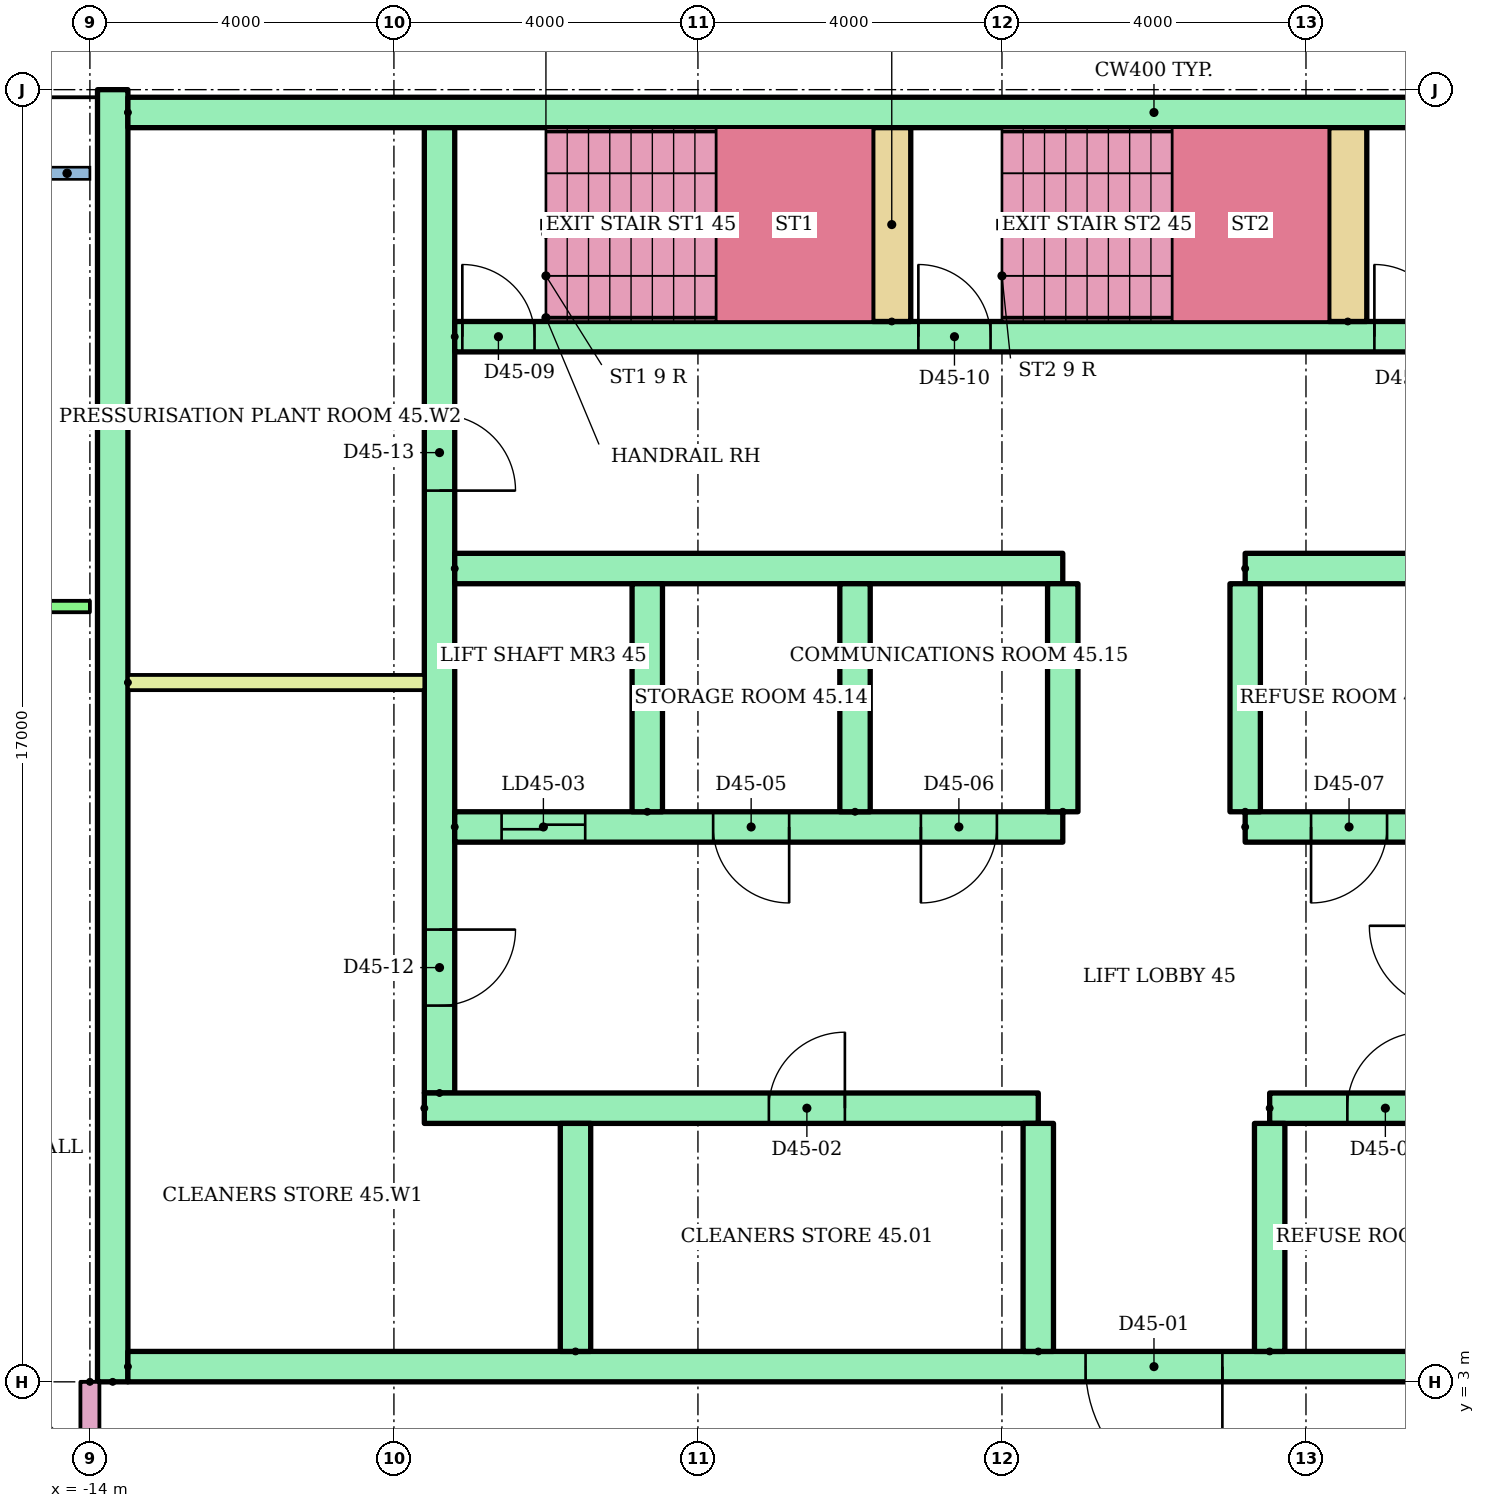
"""IFC4 building model, lengths in metres.
Left out: names, types, materials, properties, quantities, classifications, styles, units other than length and angle.
Written with IfcOpenShell. Run it as: python <this file> out.ifc"""

import sys

from ifc_helpers import new_model, si_unit, direction, frame, frame_2d, origin, place, context, subcontext, project, spatial, rectangle, extrude, element, fill, save


model = new_model("IFC4")
c1 = context("Model", 3, precision=1e-05, world=origin(), true_north=direction((0.0, 1.0)))
c2 = subcontext(c1, "Body", "Model", "MODEL_VIEW")
j1 = project(units=[si_unit("LENGTHUNIT", "METRE"), si_unit("PLANEANGLEUNIT", "RADIAN")], contexts=[c1])
p1 = place(None, origin())
s1 = spatial("IfcSite", under=j1, at=p1, CompositionType="ELEMENT")
p2 = place(p1, origin())
s2 = spatial("IfcBuilding", under=s1, at=p2, CompositionType="ELEMENT")
p3 = place(p2, frame((0.0, 0.0, 174.9)))
s3 = spatial("IfcBuildingStorey", under=s2, at=p3, CompositionType="ELEMENT", Elevation=174.9)
p4 = place(p3, frame((-13.7, 3.0, 0.0), z_axis=(0.0, 0.0, 1.0), x_axis=(0.0, 1.0, 0.0)))
e1 = element("IfcWall", 1, at=p4, inside=s3, PredefinedType="SHEAR", context=c2, shape_type="SweptSolid", body=[
    extrude(rectangle(XDim=17.0, YDim=0.4, at=frame_2d((8.5, 0.0))), origin(), (0.0, 0.0, 1.0), 2.92),
])
p5 = place(p3, frame((-13.5, 19.7, 0.0)))
e2 = element("IfcWall", 2, at=p5, inside=s3, PredefinedType="SHEAR", context=c2, shape_type="SweptSolid", body=[
    extrude(rectangle(XDim=27.0, YDim=0.4, at=frame_2d((13.5, 0.0))), origin(), (0.0, 0.0, 1.0), 2.92),
])
p6 = place(p3, frame((-9.4, 6.8, 0.0), z_axis=(0.0, 0.0, 1.0), x_axis=(0.0, 1.0, 0.0)))
e3 = element("IfcWall", 3, at=p6, inside=s3, PredefinedType="SHEAR", context=c2, shape_type="SweptSolid", body=[
    extrude(rectangle(XDim=12.7, YDim=0.4, at=frame_2d((6.35, 0.0))), origin(), (0.0, 0.0, 1.0), 2.92),
])
p7 = place(p6, frame((1.15, 0.0, 0.0)))
e4 = element("IfcOpeningElement", 4, at=p7, cuts=e3, PredefinedType="OPENING", context=c2, shape_type="SweptSolid", body=[
    extrude(rectangle(XDim=1.0, YDim=2.1, at=frame_2d((0.5, 1.05))), frame((0.0, 0.21, 0.0), z_axis=(0.0, -1.0, 0.0), x_axis=(1.0, 0.0, 0.0)), (0.0, 0.0, 1.0), 0.42),
])
p8 = place(p6, frame((7.925, 0.0, 0.0)))
e5 = element("IfcOpeningElement", 5, at=p8, cuts=e3, PredefinedType="OPENING", context=c2, shape_type="SweptSolid", body=[
    extrude(rectangle(XDim=1.0, YDim=2.1, at=frame_2d((0.5, 1.05))), frame((0.0, 0.21, 0.0), z_axis=(0.0, -1.0, 0.0), x_axis=(1.0, 0.0, 0.0)), (0.0, 0.0, 1.0), 0.42),
])
p9 = place(p3, frame((-13.5, 3.2, 0.0)))
e6 = element("IfcWall", 6, at=p9, inside=s3, PredefinedType="SHEAR", context=c2, shape_type="SweptSolid", body=[
    extrude(rectangle(XDim=27.0, YDim=0.4, at=frame_2d((13.5, 0.0))), origin(), (0.0, 0.0, 1.0), 2.92),
])
p10 = place(p9, frame((22.083, 0.0, 0.0)))
e7 = element("IfcOpeningElement", 7, at=p10, cuts=e6, PredefinedType="OPENING", context=c2, shape_type="SweptSolid", body=[
    extrude(rectangle(XDim=1.1, YDim=2.1, at=frame_2d((0.55, 1.05))), frame((0.0, 0.21, 0.0), z_axis=(0.0, -1.0, 0.0), x_axis=(1.0, 0.0, 0.0)), (0.0, 0.0, 1.0), 0.42),
])
p11 = place(p9, frame((25.128, 0.0, 0.0)))
e8 = element("IfcOpeningElement", 8, at=p11, cuts=e6, PredefinedType="OPENING", context=c2, shape_type="SweptSolid", body=[
    extrude(rectangle(XDim=1.1, YDim=2.1, at=frame_2d((0.55, 1.05))), frame((0.0, 0.21, 0.0), z_axis=(0.0, -1.0, 0.0), x_axis=(1.0, 0.0, 0.0)), (0.0, 0.0, 1.0), 0.42),
])
p12 = place(p9, frame((12.6, 0.0, 0.0)))
e9 = element("IfcOpeningElement", 9, at=p12, cuts=e6, PredefinedType="OPENING", context=c2, shape_type="SweptSolid", body=[
    extrude(rectangle(XDim=1.8, YDim=2.1, at=frame_2d((0.9, 1.05))), frame((0.0, 0.21, 0.0), z_axis=(0.0, -1.0, 0.0), x_axis=(1.0, 0.0, 0.0)), (0.0, 0.0, 1.0), 0.42),
])
p13 = place(p3, frame((-9.6, 6.6, 0.0)))
e10 = element("IfcWall", 10, at=p13, inside=s3, PredefinedType="SHEAR", context=c2, shape_type="SweptSolid", body=[
    extrude(rectangle(XDim=8.078, YDim=0.4, at=frame_2d((4.039, 0.0))), origin(), (0.0, 0.0, 1.0), 2.92),
])
p14 = place(p13, frame((4.533, 0.0, 0.0)))
e11 = element("IfcOpeningElement", 11, at=p14, cuts=e10, PredefinedType="OPENING", context=c2, shape_type="SweptSolid", body=[
    extrude(rectangle(XDim=1.0, YDim=2.1, at=frame_2d((0.5, 1.05))), frame((0.0, 0.21, 0.0), z_axis=(0.0, -1.0, 0.0), x_axis=(1.0, 0.0, 0.0)), (0.0, 0.0, 1.0), 0.42),
])
p15 = place(p3, frame((1.522, 6.6, 0.0)))
e12 = element("IfcWall", 12, at=p15, inside=s3, PredefinedType="SHEAR", context=c2, shape_type="SweptSolid", body=[
    extrude(rectangle(XDim=11.978, YDim=0.4, at=frame_2d((5.989, 0.0))), origin(), (0.0, 0.0, 1.0), 2.92),
])
p16 = place(p15, frame((1.022, 0.0, 0.0)))
e13 = element("IfcOpeningElement", 13, at=p16, cuts=e12, PredefinedType="OPENING", context=c2, shape_type="SweptSolid", body=[
    extrude(rectangle(XDim=1.0, YDim=2.1, at=frame_2d((0.5, 1.05))), frame((0.0, 0.21, 0.0), z_axis=(0.0, -1.0, 0.0), x_axis=(1.0, 0.0, 0.0)), (0.0, 0.0, 1.0), 0.42),
])
p17 = place(p15, frame((4.067, 0.0, 0.0)))
e14 = element("IfcOpeningElement", 14, at=p17, cuts=e12, PredefinedType="OPENING", context=c2, shape_type="SweptSolid", body=[
    extrude(rectangle(XDim=1.0, YDim=2.1, at=frame_2d((0.5, 1.05))), frame((0.0, 0.21, 0.0), z_axis=(0.0, -1.0, 0.0), x_axis=(1.0, 0.0, 0.0)), (0.0, 0.0, 1.0), 0.42),
])
for number, where, z_axis, x_axis in (
    (15, (-7.611, 3.4, 0.0), (0.0, 0.0, 1.0), (0.0, 1.0, 0.0)),
    (16, (-1.522, 3.4, 0.0), (0.0, 0.0, 1.0), (0.0, 1.0, 0.0)),
    (17, (1.522, 3.4, 0.0), (0.0, 0.0, 1.0), (0.0, 1.0, 0.0)),
):
    element("IfcWall", number, at=place(p3, frame(where, z_axis=z_axis, x_axis=x_axis)), inside=s3, PredefinedType="SHEAR", context=c2, shape_type="SweptSolid", body=[
        extrude(rectangle(XDim=3.0, YDim=0.4, at=frame_2d((1.5, 0.0))), origin(), (0.0, 0.0, 1.0), 2.92),
    ])
p18 = place(p3, frame((-9.2, 10.3, 0.0)))
e18 = element("IfcWall", 18, at=p18, inside=s3, PredefinedType="SHEAR", context=c2, shape_type="SweptSolid", body=[
    extrude(rectangle(XDim=8.0, YDim=0.4, at=frame_2d((4.0, 0.0))), origin(), (0.0, 0.0, 1.0), 2.92),
])
p19 = place(p18, frame((0.617, 0.0, 0.0)))
e19 = element("IfcOpeningElement", 19, at=p19, cuts=e18, PredefinedType="OPENING", context=c2, shape_type="SweptSolid", body=[
    extrude(rectangle(XDim=1.1, YDim=2.1, at=frame_2d((0.55, 1.05))), frame((0.0, 0.21, 0.0), z_axis=(0.0, -1.0, 0.0), x_axis=(1.0, 0.0, 0.0)), (0.0, 0.0, 1.0), 0.42),
])
p20 = place(p18, frame((3.4, 0.0, 0.0)))
e20 = element("IfcOpeningElement", 20, at=p20, cuts=e18, PredefinedType="OPENING", context=c2, shape_type="SweptSolid", body=[
    extrude(rectangle(XDim=1.0, YDim=2.1, at=frame_2d((0.5, 1.05))), frame((0.0, 0.21, 0.0), z_axis=(0.0, -1.0, 0.0), x_axis=(1.0, 0.0, 0.0)), (0.0, 0.0, 1.0), 0.42),
])
p21 = place(p18, frame((6.133, 0.0, 0.0)))
e21 = element("IfcOpeningElement", 21, at=p21, cuts=e18, PredefinedType="OPENING", context=c2, shape_type="SweptSolid", body=[
    extrude(rectangle(XDim=1.0, YDim=2.1, at=frame_2d((0.5, 1.05))), frame((0.0, 0.21, 0.0), z_axis=(0.0, -1.0, 0.0), x_axis=(1.0, 0.0, 0.0)), (0.0, 0.0, 1.0), 0.42),
])
p22 = place(p3, frame((-9.2, 13.7, 0.0)))
e22 = element("IfcWall", 22, at=p22, inside=s3, PredefinedType="SHEAR", context=c2, shape_type="SweptSolid", body=[
    extrude(rectangle(XDim=8.0, YDim=0.4, at=frame_2d((4.0, 0.0))), origin(), (0.0, 0.0, 1.0), 2.92),
])
p23 = place(p3, frame((1.2, 10.3, 0.0)))
e23 = element("IfcWall", 23, at=p23, inside=s3, PredefinedType="SHEAR", context=c2, shape_type="SweptSolid", body=[
    extrude(rectangle(XDim=8.0, YDim=0.4, at=frame_2d((4.0, 0.0))), origin(), (0.0, 0.0, 1.0), 2.92),
])
p24 = place(p23, frame((3.55, 0.0, 0.0)))
e24 = element("IfcOpeningElement", 24, at=p24, cuts=e23, PredefinedType="OPENING", context=c2, shape_type="SweptSolid", body=[
    extrude(rectangle(XDim=1.1, YDim=2.1, at=frame_2d((0.55, 1.05))), frame((0.0, 0.21, 0.0), z_axis=(0.0, -1.0, 0.0), x_axis=(1.0, 0.0, 0.0)), (0.0, 0.0, 1.0), 0.42),
])
p25 = place(p23, frame((6.283, 0.0, 0.0)))
e25 = element("IfcOpeningElement", 25, at=p25, cuts=e23, PredefinedType="OPENING", context=c2, shape_type="SweptSolid", body=[
    extrude(rectangle(XDim=1.1, YDim=2.1, at=frame_2d((0.55, 1.05))), frame((0.0, 0.21, 0.0), z_axis=(0.0, -1.0, 0.0), x_axis=(1.0, 0.0, 0.0)), (0.0, 0.0, 1.0), 0.42),
])
p26 = place(p23, frame((0.867, 0.0, 0.0)))
e26 = element("IfcOpeningElement", 26, at=p26, cuts=e23, PredefinedType="OPENING", context=c2, shape_type="SweptSolid", body=[
    extrude(rectangle(XDim=1.0, YDim=2.1, at=frame_2d((0.5, 1.05))), frame((0.0, 0.21, 0.0), z_axis=(0.0, -1.0, 0.0), x_axis=(1.0, 0.0, 0.0)), (0.0, 0.0, 1.0), 0.42),
])
p27 = place(p3, frame((1.2, 13.7, 0.0)))
e27 = element("IfcWall", 27, at=p27, inside=s3, PredefinedType="SHEAR", context=c2, shape_type="SweptSolid", body=[
    extrude(rectangle(XDim=8.0, YDim=0.4, at=frame_2d((4.0, 0.0))), origin(), (0.0, 0.0, 1.0), 2.92),
])
for number, where, z_axis, x_axis in (
    (28, (-6.667, 10.5, 0.0), (0.0, 0.0, 1.0), (0.0, 1.0, 0.0)),
    (29, (-3.933, 10.5, 0.0), (0.0, 0.0, 1.0), (0.0, 1.0, 0.0)),
    (30, (-1.2, 10.5, 0.0), (0.0, 0.0, 1.0), (0.0, 1.0, 0.0)),
    (31, (1.2, 10.5, 0.0), (0.0, 0.0, 1.0), (0.0, 1.0, 0.0)),
):
    element("IfcWall", number, at=place(p3, frame(where, z_axis=z_axis, x_axis=x_axis)), inside=s3, PredefinedType="SHEAR", context=c2, shape_type="SweptSolid", body=[
        extrude(rectangle(XDim=3.0, YDim=0.4, at=frame_2d((1.5, 0.0))), origin(), (0.0, 0.0, 1.0), 2.92),
    ])
p28 = place(p3, frame((-9.2, 16.75, 0.0)))
e32 = element("IfcWall", 32, at=p28, inside=s3, PredefinedType="SHEAR", context=c2, shape_type="SweptSolid", body=[
    extrude(rectangle(XDim=18.4, YDim=0.4, at=frame_2d((9.2, 0.0))), origin(), (0.0, 0.0, 1.0), 2.92),
])
p29 = place(p28, frame((0.1, 0.0, 0.0)))
e33 = element("IfcOpeningElement", 33, at=p29, cuts=e32, PredefinedType="OPENING", context=c2, shape_type="SweptSolid", body=[
    extrude(rectangle(XDim=0.95, YDim=2.1, at=frame_2d((0.475, 1.05))), frame((0.0, 0.21, 0.0), z_axis=(0.0, -1.0, 0.0), x_axis=(1.0, 0.0, 0.0)), (0.0, 0.0, 1.0), 0.42),
])
p30 = place(p28, frame((6.1, 0.0, 0.0)))
e34 = element("IfcOpeningElement", 34, at=p30, cuts=e32, PredefinedType="OPENING", context=c2, shape_type="SweptSolid", body=[
    extrude(rectangle(XDim=0.95, YDim=2.1, at=frame_2d((0.475, 1.05))), frame((0.0, 0.21, 0.0), z_axis=(0.0, -1.0, 0.0), x_axis=(1.0, 0.0, 0.0)), (0.0, 0.0, 1.0), 0.42),
])
p31 = place(p28, frame((12.1, 0.0, 0.0)))
e35 = element("IfcOpeningElement", 35, at=p31, cuts=e32, PredefinedType="OPENING", context=c2, shape_type="SweptSolid", body=[
    extrude(rectangle(XDim=0.95, YDim=2.1, at=frame_2d((0.475, 1.05))), frame((0.0, 0.21, 0.0), z_axis=(0.0, -1.0, 0.0), x_axis=(1.0, 0.0, 0.0)), (0.0, 0.0, 1.0), 0.42),
])
for number, where, z_axis, x_axis in (
    (36, (-3.45, 16.95, 0.0), (0.0, 0.0, 1.0), (0.0, 1.0, 0.0)),
    (37, (2.55, 16.95, 0.0), (0.0, 0.0, 1.0), (0.0, 1.0, 0.0)),
):
    element("IfcWall", number, at=place(p3, frame(where, z_axis=z_axis, x_axis=x_axis)), inside=s3, PredefinedType="SHEAR", context=c2, shape_type="SweptSolid", body=[
        extrude(rectangle(XDim=2.55, YDim=0.5, at=frame_2d((1.275, 0.0))), origin(), (0.0, 0.0, 1.0), 2.92),
    ])
p32 = place(p3, frame((-13.5, 12.2, 0.0)))
e38 = element("IfcWall", 38, at=p32, inside=s3, PredefinedType="PARTITIONING", context=c2, shape_type="SweptSolid", body=[
    extrude(rectangle(XDim=3.9, YDim=0.2, at=frame_2d((1.95, 0.0))), origin(), (0.0, 0.0, 1.0), 2.92),
])
p33 = place(p3, frame((-24.82, 13.2, 0.0)))
e39 = element("IfcWall", 39, at=p33, inside=s3, PredefinedType="PARTITIONING", context=c2, shape_type="SweptSolid", body=[
    extrude(rectangle(XDim=10.82, YDim=0.15, at=frame_2d((5.41, 0.0))), origin(), (0.0, 0.0, 1.0), 2.4),
])
p34 = place(p33, frame((1.97, 0.0, 0.0)))
e40 = element("IfcOpeningElement", 40, at=p34, cuts=e39, PredefinedType="OPENING", context=c2, shape_type="SweptSolid", body=[
    extrude(rectangle(XDim=1.0, YDim=2.1, at=frame_2d((0.5, 1.05))), frame((0.0, 0.085, 0.0), z_axis=(0.0, -1.0, 0.0), x_axis=(1.0, 0.0, 0.0)), (0.0, 0.0, 1.0), 0.17),
])
p35 = place(p33, frame((7.27, 0.0, 0.0)))
e41 = element("IfcOpeningElement", 41, at=p35, cuts=e39, PredefinedType="OPENING", context=c2, shape_type="SweptSolid", body=[
    extrude(rectangle(XDim=1.0, YDim=2.1, at=frame_2d((0.5, 1.05))), frame((0.0, 0.085, 0.0), z_axis=(0.0, -1.0, 0.0), x_axis=(1.0, 0.0, 0.0)), (0.0, 0.0, 1.0), 0.17),
])
p36 = place(p3, frame((-14.0, 3.0, 0.0), z_axis=(0.0, 0.0, 1.0), x_axis=(0.0, -1.0, 0.0)))
e42 = element("IfcWall", 42, at=p36, inside=s3, PredefinedType="PARTITIONING", context=c2, shape_type="SweptSolid", body=[
    extrude(rectangle(XDim=1.6, YDim=0.25, at=frame_2d((0.8, 0.0))), origin(), (0.0, 0.0, 1.0), 2.4),
])
p37 = place(p12, frame((1.8, 0.0, 0.0), z_axis=(0.0, 0.0, 1.0), x_axis=(-1.0, 0.0, 0.0)))
e43 = element("IfcDoor", 43, at=p37, inside=s3, OperationType="DOUBLE_DOOR_SINGLE_SWING", PredefinedType="DOOR", context=c2, shape_type="SweptSolid", body=[
    extrude(rectangle(XDim=1.8, YDim=2.1, at=frame_2d((0.9, 1.05))), frame((0.0, 0.025, 0.0), z_axis=(0.0, -1.0, 0.0), x_axis=(1.0, 0.0, 0.0)), (0.0, 0.0, 1.0), 0.05),
])
fill(e9, e43)
p38 = place(p14, origin())
e44 = element("IfcDoor", 44, at=p38, inside=s3, OperationType="SINGLE_SWING_RIGHT", PredefinedType="DOOR", context=c2, shape_type="SweptSolid", body=[
    extrude(rectangle(XDim=1.0, YDim=2.1, at=frame_2d((0.5, 1.05))), frame((0.0, 0.025, 0.0), z_axis=(0.0, -1.0, 0.0), x_axis=(1.0, 0.0, 0.0)), (0.0, 0.0, 1.0), 0.05),
])
fill(e11, e44)
p39 = place(p16, origin())
e45 = element("IfcDoor", 45, at=p39, inside=s3, OperationType="SINGLE_SWING_RIGHT", PredefinedType="DOOR", context=c2, shape_type="SweptSolid", body=[
    extrude(rectangle(XDim=1.0, YDim=2.1, at=frame_2d((0.5, 1.05))), frame((0.0, 0.025, 0.0), z_axis=(0.0, -1.0, 0.0), x_axis=(1.0, 0.0, 0.0)), (0.0, 0.0, 1.0), 0.05),
])
fill(e13, e45)
p40 = place(p19, origin())
e46 = element("IfcDoor", 46, at=p40, inside=s3, OperationType="SLIDING_TO_LEFT", PredefinedType="DOOR", context=c2, shape_type="SweptSolid", body=[
    extrude(rectangle(XDim=1.1, YDim=2.1, at=frame_2d((0.55, 1.05))), frame((0.0, 0.025, 0.0), z_axis=(0.0, -1.0, 0.0), x_axis=(1.0, 0.0, 0.0)), (0.0, 0.0, 1.0), 0.05),
])
fill(e19, e46)
p41 = place(p20, frame((1.0, 0.0, 0.0), z_axis=(0.0, 0.0, 1.0), x_axis=(-1.0, 0.0, 0.0)))
e47 = element("IfcDoor", 47, at=p41, inside=s3, OperationType="SINGLE_SWING_RIGHT", PredefinedType="DOOR", context=c2, shape_type="SweptSolid", body=[
    extrude(rectangle(XDim=1.0, YDim=2.1, at=frame_2d((0.5, 1.05))), frame((0.0, 0.025, 0.0), z_axis=(0.0, -1.0, 0.0), x_axis=(1.0, 0.0, 0.0)), (0.0, 0.0, 1.0), 0.05),
])
fill(e20, e47)
p42 = place(p21, frame((1.0, 0.0, 0.0), z_axis=(0.0, 0.0, 1.0), x_axis=(-1.0, 0.0, 0.0)))
e48 = element("IfcDoor", 48, at=p42, inside=s3, OperationType="SINGLE_SWING_LEFT", PredefinedType="DOOR", context=c2, shape_type="SweptSolid", body=[
    extrude(rectangle(XDim=1.0, YDim=2.1, at=frame_2d((0.5, 1.05))), frame((0.0, 0.025, 0.0), z_axis=(0.0, -1.0, 0.0), x_axis=(1.0, 0.0, 0.0)), (0.0, 0.0, 1.0), 0.05),
])
fill(e21, e48)
p43 = place(p26, frame((1.0, 0.0, 0.0), z_axis=(0.0, 0.0, 1.0), x_axis=(-1.0, 0.0, 0.0)))
e49 = element("IfcDoor", 49, at=p43, inside=s3, OperationType="SINGLE_SWING_LEFT", PredefinedType="DOOR", context=c2, shape_type="SweptSolid", body=[
    extrude(rectangle(XDim=1.0, YDim=2.1, at=frame_2d((0.5, 1.05))), frame((0.0, 0.025, 0.0), z_axis=(0.0, -1.0, 0.0), x_axis=(1.0, 0.0, 0.0)), (0.0, 0.0, 1.0), 0.05),
])
fill(e26, e49)
p44 = place(p29, origin())
e50 = element("IfcDoor", 50, at=p44, inside=s3, OperationType="SINGLE_SWING_LEFT", PredefinedType="DOOR", context=c2, shape_type="SweptSolid", body=[
    extrude(rectangle(XDim=0.95, YDim=2.1, at=frame_2d((0.475, 1.05))), frame((0.0, 0.025, 0.0), z_axis=(0.0, -1.0, 0.0), x_axis=(1.0, 0.0, 0.0)), (0.0, 0.0, 1.0), 0.05),
])
fill(e33, e50)
p45 = place(p30, origin())
e51 = element("IfcDoor", 51, at=p45, inside=s3, OperationType="SINGLE_SWING_LEFT", PredefinedType="DOOR", context=c2, shape_type="SweptSolid", body=[
    extrude(rectangle(XDim=0.95, YDim=2.1, at=frame_2d((0.475, 1.05))), frame((0.0, 0.025, 0.0), z_axis=(0.0, -1.0, 0.0), x_axis=(1.0, 0.0, 0.0)), (0.0, 0.0, 1.0), 0.05),
])
fill(e34, e51)
p46 = place(p31, origin())
e52 = element("IfcDoor", 52, at=p46, inside=s3, OperationType="SINGLE_SWING_LEFT", PredefinedType="DOOR", context=c2, shape_type="SweptSolid", body=[
    extrude(rectangle(XDim=0.95, YDim=2.1, at=frame_2d((0.475, 1.05))), frame((0.0, 0.025, 0.0), z_axis=(0.0, -1.0, 0.0), x_axis=(1.0, 0.0, 0.0)), (0.0, 0.0, 1.0), 0.05),
])
fill(e35, e52)
p47 = place(p7, frame((1.0, 0.0, 0.0), z_axis=(0.0, 0.0, 1.0), x_axis=(-1.0, 0.0, 0.0)))
e53 = element("IfcDoor", 53, at=p47, inside=s3, OperationType="SINGLE_SWING_RIGHT", PredefinedType="DOOR", context=c2, shape_type="SweptSolid", body=[
    extrude(rectangle(XDim=1.0, YDim=2.1, at=frame_2d((0.5, 1.05))), frame((0.0, 0.025, 0.0), z_axis=(0.0, -1.0, 0.0), x_axis=(1.0, 0.0, 0.0)), (0.0, 0.0, 1.0), 0.05),
])
fill(e4, e53)
p48 = place(p8, frame((1.0, 0.0, 0.0), z_axis=(0.0, 0.0, 1.0), x_axis=(-1.0, 0.0, 0.0)))
e54 = element("IfcDoor", 54, at=p48, inside=s3, OperationType="SINGLE_SWING_LEFT", PredefinedType="DOOR", context=c2, shape_type="SweptSolid", body=[
    extrude(rectangle(XDim=1.0, YDim=2.1, at=frame_2d((0.5, 1.05))), frame((0.0, 0.025, 0.0), z_axis=(0.0, -1.0, 0.0), x_axis=(1.0, 0.0, 0.0)), (0.0, 0.0, 1.0), 0.05),
])
fill(e5, e54)
save(model, sys.argv[1])
